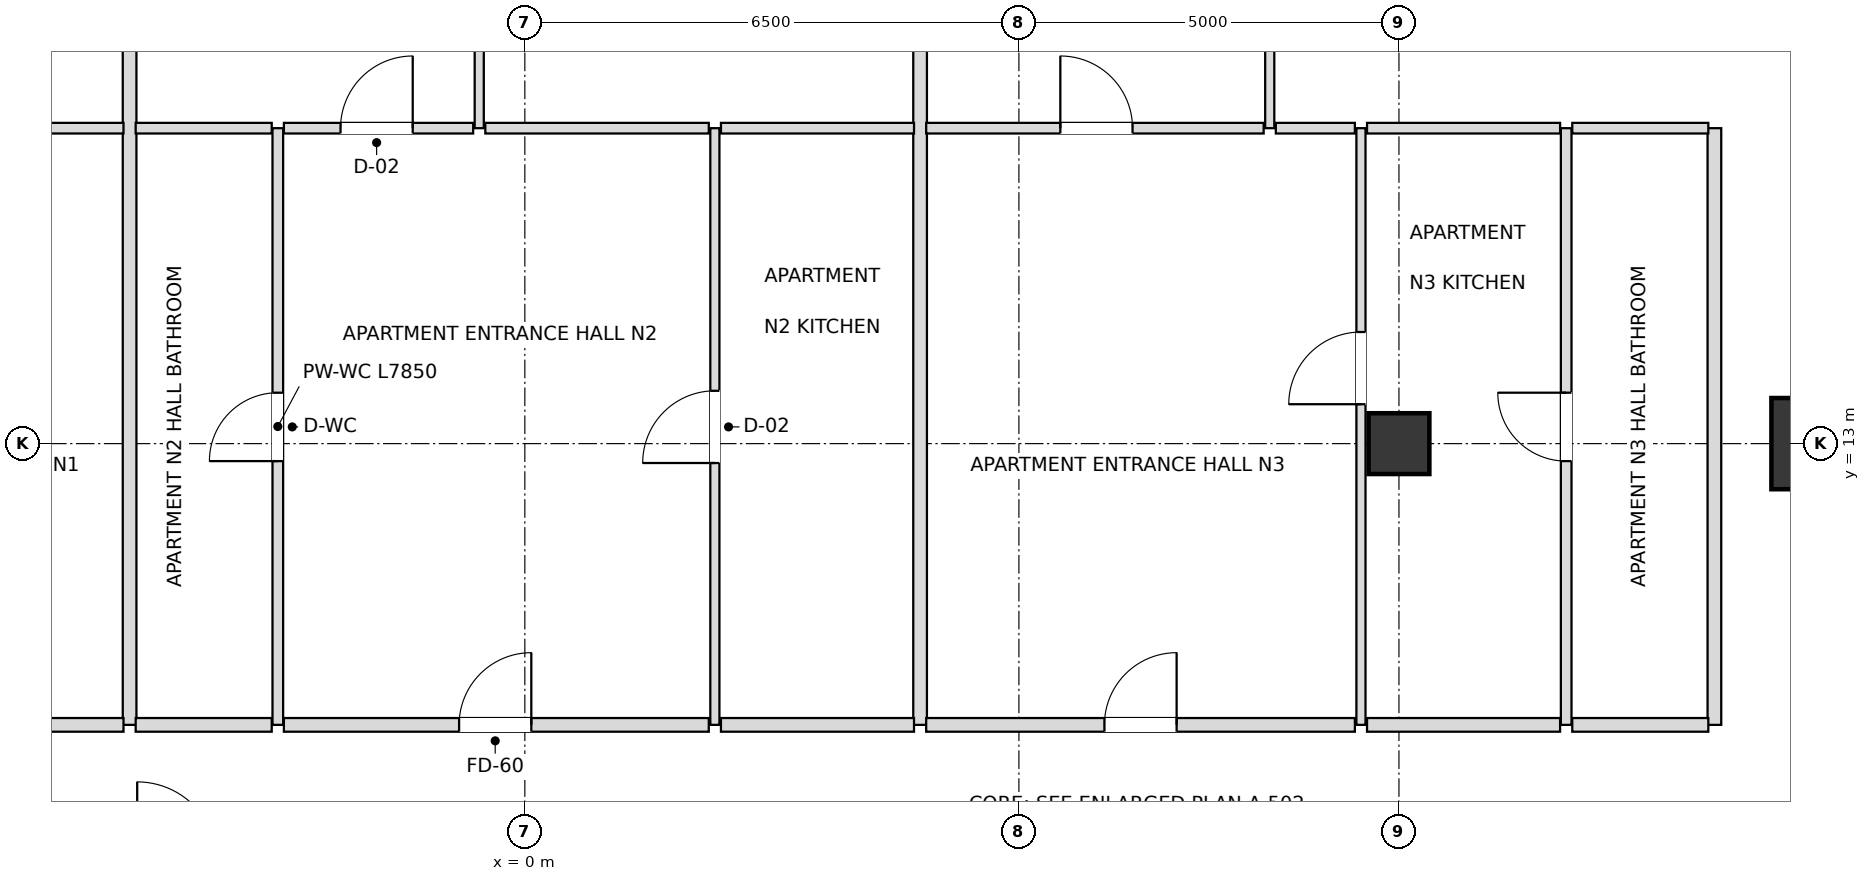
"""IFC4 building model, lengths in metres.
Left out: names, types, materials, properties, quantities, classifications, styles, units other than length and angle.
Written with IfcOpenShell. Run it as: python <this file> out.ifc"""

import sys

from ifc_helpers import new_model, si_unit, direction, frame, frame_2d, origin, origin_2d, place, context, subcontext, project, spatial, rectangle, extrude, element, fill, save


model = new_model("IFC4")
c1 = context("Model", 3, precision=1e-05, world=origin(), true_north=direction((0.0, 1.0)))
c2 = subcontext(c1, "Body", "Model", "MODEL_VIEW")
j1 = project(units=[si_unit("LENGTHUNIT", "METRE"), si_unit("PLANEANGLEUNIT", "RADIAN")], contexts=[c1])
p1 = place(None, origin())
s1 = spatial("IfcSite", under=j1, at=p1, CompositionType="ELEMENT")
p2 = place(p1, origin())
s2 = spatial("IfcBuilding", under=s1, at=p2, CompositionType="ELEMENT")
p3 = place(p2, frame((0.0, 0.0, 106.2)))
s3 = spatial("IfcBuildingStorey", under=s2, at=p3, CompositionType="ELEMENT", Elevation=106.2)
p4 = place(p3, frame((17.0, 13.0, 0.0), z_axis=(0.0, 0.0, 1.0), x_axis=(1.0, 0.0, 0.0)))
e1 = element("IfcColumn", 1, at=p4, inside=s3, PredefinedType="USERDEFINED", context=c2, shape_type="SweptSolid", body=[
    extrude(rectangle(XDim=1.2, YDim=1.2, at=origin_2d()), origin(), (0.0, 0.0, 1.0), 3.6),
])
p5 = place(p3, frame((11.5, 13.0, 0.0), z_axis=(0.0, 0.0, 1.0), x_axis=(1.0, 0.0, 0.0)))
e2 = element("IfcColumn", 2, at=p5, inside=s3, PredefinedType="COLUMN", context=c2, shape_type="SweptSolid", body=[
    extrude(rectangle(XDim=0.8, YDim=0.8, at=origin_2d()), origin(), (0.0, 0.0, 1.0), 3.6),
])
p6 = place(p3, frame((-5.2, 9.3, 0.0), z_axis=(0.0, 0.0, 1.0), x_axis=(0.0, 1.0, 0.0)))
e3 = element("IfcWall", 3, at=p6, inside=s3, PredefinedType="PARTITIONING", context=c2, shape_type="SweptSolid", body=[
    extrude(rectangle(XDim=13.85, YDim=0.18, at=frame_2d((6.925, 0.0))), origin(), (0.0, 0.0, 1.0), 2.816),
])
p7 = place(p3, frame((-3.25, 9.3, 0.0), z_axis=(0.0, 0.0, 1.0), x_axis=(0.0, 1.0, 0.0)))
e4 = element("IfcWall", 4, at=p7, inside=s3, PredefinedType="PARTITIONING", context=c2, shape_type="SweptSolid", body=[
    extrude(rectangle(XDim=7.85, YDim=0.14, at=frame_2d((3.925, 0.0))), origin(), (0.0, 0.0, 1.0), 3.38),
])
p8 = place(p7, frame((3.47, 0.0, 0.0)))
e5 = element("IfcOpeningElement", 5, at=p8, cuts=e4, PredefinedType="OPENING", context=c2, shape_type="SweptSolid", body=[
    extrude(rectangle(XDim=0.9, YDim=2.1, at=frame_2d((0.45, 1.05))), frame((0.0, 0.08, 0.0), z_axis=(0.0, -1.0, 0.0), x_axis=(1.0, 0.0, 0.0)), (0.0, 0.0, 1.0), 0.16),
])
p9 = place(p3, frame((-0.6, 17.15, 0.0), z_axis=(0.0, 0.0, 1.0), x_axis=(0.0, 1.0, 0.0)))
e6 = element("IfcWall", 6, at=p9, inside=s3, PredefinedType="PARTITIONING", context=c2, shape_type="SweptSolid", body=[
    extrude(rectangle(XDim=6.0, YDim=0.12, at=frame_2d((3.0, 0.0))), origin(), (0.0, 0.0, 1.0), 2.816),
])
p10 = place(p9, frame((2.55, 0.0, 0.0)))
e7 = element("IfcOpeningElement", 7, at=p10, cuts=e6, PredefinedType="OPENING", context=c2, shape_type="SweptSolid", body=[
    extrude(rectangle(XDim=0.9, YDim=2.1, at=frame_2d((0.45, 1.05))), frame((0.0, 0.07, 0.0), z_axis=(0.0, -1.0, 0.0), x_axis=(1.0, 0.0, 0.0)), (0.0, 0.0, 1.0), 0.14),
])
p11 = place(p3, frame((2.5, 9.3, 0.0), z_axis=(0.0, 0.0, 1.0), x_axis=(0.0, 1.0, 0.0)))
e8 = element("IfcWall", 8, at=p11, inside=s3, PredefinedType="PARTITIONING", context=c2, shape_type="SweptSolid", body=[
    extrude(rectangle(XDim=7.85, YDim=0.12, at=frame_2d((3.925, 0.0))), origin(), (0.0, 0.0, 1.0), 3.38),
])
p12 = place(p11, frame((3.445, 0.0, 0.0)))
e9 = element("IfcOpeningElement", 9, at=p12, cuts=e8, PredefinedType="OPENING", context=c2, shape_type="SweptSolid", body=[
    extrude(rectangle(XDim=0.95, YDim=2.1, at=frame_2d((0.475, 1.05))), frame((0.0, 0.07, 0.0), z_axis=(0.0, -1.0, 0.0), x_axis=(1.0, 0.0, 0.0)), (0.0, 0.0, 1.0), 0.14),
])
p13 = place(p3, frame((5.2, 9.3, 0.0), z_axis=(0.0, 0.0, 1.0), x_axis=(0.0, 1.0, 0.0)))
e10 = element("IfcWall", 10, at=p13, inside=s3, PredefinedType="PARTITIONING", context=c2, shape_type="SweptSolid", body=[
    extrude(rectangle(XDim=13.85, YDim=0.18, at=frame_2d((6.925, 0.0))), origin(), (0.0, 0.0, 1.0), 2.816),
])
p14 = place(p3, frame((9.8, 17.15, 0.0), z_axis=(0.0, 0.0, 1.0), x_axis=(0.0, 1.0, 0.0)))
e11 = element("IfcWall", 11, at=p14, inside=s3, PredefinedType="PARTITIONING", context=c2, shape_type="SweptSolid", body=[
    extrude(rectangle(XDim=6.0, YDim=0.12, at=frame_2d((3.0, 0.0))), origin(), (0.0, 0.0, 1.0), 2.816),
])
p15 = place(p14, frame((3.701, 0.0, 0.0)))
e12 = element("IfcOpeningElement", 12, at=p15, cuts=e11, PredefinedType="OPENING", context=c2, shape_type="SweptSolid", body=[
    extrude(rectangle(XDim=0.9, YDim=2.1, at=frame_2d((0.45, 1.05))), frame((0.0, 0.07, 0.0), z_axis=(0.0, -1.0, 0.0), x_axis=(1.0, 0.0, 0.0)), (0.0, 0.0, 1.0), 0.14),
])
p16 = place(p3, frame((11.0, 9.3, 0.0), z_axis=(0.0, 0.0, 1.0), x_axis=(0.0, 1.0, 0.0)))
e13 = element("IfcWall", 13, at=p16, inside=s3, PredefinedType="PARTITIONING", context=c2, shape_type="SweptSolid", body=[
    extrude(rectangle(XDim=7.85, YDim=0.12, at=frame_2d((3.925, 0.0))), origin(), (0.0, 0.0, 1.0), 2.816),
])
p17 = place(p16, frame((4.219, 0.0, 0.0)))
e14 = element("IfcOpeningElement", 14, at=p17, cuts=e13, PredefinedType="OPENING", context=c2, shape_type="SweptSolid", body=[
    extrude(rectangle(XDim=0.95, YDim=2.1, at=frame_2d((0.475, 1.05))), frame((0.0, 0.07, 0.0), z_axis=(0.0, -1.0, 0.0), x_axis=(1.0, 0.0, 0.0)), (0.0, 0.0, 1.0), 0.14),
])
p18 = place(p3, frame((13.7, 9.3, 0.0), z_axis=(0.0, 0.0, 1.0), x_axis=(0.0, 1.0, 0.0)))
e15 = element("IfcWall", 15, at=p18, inside=s3, PredefinedType="PARTITIONING", context=c2, shape_type="SweptSolid", body=[
    extrude(rectangle(XDim=7.85, YDim=0.14, at=frame_2d((3.925, 0.0))), origin(), (0.0, 0.0, 1.0), 2.736),
])
p19 = place(p18, frame((3.47, 0.0, 0.0)))
e16 = element("IfcOpeningElement", 16, at=p19, cuts=e15, PredefinedType="OPENING", context=c2, shape_type="SweptSolid", body=[
    extrude(rectangle(XDim=0.9, YDim=2.1, at=frame_2d((0.45, 1.05))), frame((0.0, 0.08, 0.0), z_axis=(0.0, -1.0, 0.0), x_axis=(1.0, 0.0, 0.0)), (0.0, 0.0, 1.0), 0.16),
])
p20 = place(p3, frame((15.65, 9.3, 0.0), z_axis=(0.0, 0.0, 1.0), x_axis=(0.0, 1.0, 0.0)))
e17 = element("IfcWall", 17, at=p20, inside=s3, PredefinedType="PARTITIONING", context=c2, shape_type="SweptSolid", body=[
    extrude(rectangle(XDim=7.85, YDim=0.18, at=frame_2d((3.925, 0.0))), origin(), (0.0, 0.0, 1.0), 2.736),
])
p21 = place(p3, frame((-10.92, 9.3, 0.0), z_axis=(0.0, 0.0, 1.0), x_axis=(1.0, 0.0, 0.0)))
e18 = element("IfcWall", 18, at=p21, inside=s3, PredefinedType="PARTITIONING", context=c2, shape_type="SweptSolid", body=[
    extrude(rectangle(XDim=5.64, YDim=0.18, at=frame_2d((2.82, 0.0))), origin(), (0.0, 0.0, 1.0), 2.816),
])
p22 = place(p21, frame((2.335, 0.0, 0.0)))
e19 = element("IfcOpeningElement", 19, at=p22, cuts=e18, PredefinedType="OPENING", context=c2, shape_type="SweptSolid", body=[
    extrude(rectangle(XDim=0.95, YDim=2.15, at=frame_2d((0.475, 1.075))), frame((0.0, 0.1, 0.0), z_axis=(0.0, -1.0, 0.0), x_axis=(1.0, 0.0, 0.0)), (0.0, 0.0, 1.0), 0.2),
])
p23 = place(p3, frame((-5.12, 9.3, 0.0), z_axis=(0.0, 0.0, 1.0), x_axis=(1.0, 0.0, 0.0)))
e20 = element("IfcWall", 20, at=p23, inside=s3, PredefinedType="PARTITIONING", context=c2, shape_type="SweptSolid", body=[
    extrude(rectangle(XDim=1.79, YDim=0.18, at=frame_2d((0.895, 0.0))), origin(), (0.0, 0.0, 1.0), 3.38),
])
p24 = place(p3, frame((-3.17, 9.3, 0.0), z_axis=(0.0, 0.0, 1.0), x_axis=(1.0, 0.0, 0.0)))
e21 = element("IfcWall", 21, at=p24, inside=s3, PredefinedType="PARTITIONING", context=c2, shape_type="SweptSolid", body=[
    extrude(rectangle(XDim=5.59, YDim=0.18, at=frame_2d((2.795, 0.0))), origin(), (0.0, 0.0, 1.0), 3.38),
])
p25 = place(p24, frame((2.305, 0.0, 0.0)))
e22 = element("IfcOpeningElement", 22, at=p25, cuts=e21, PredefinedType="OPENING", context=c2, shape_type="SweptSolid", body=[
    extrude(rectangle(XDim=0.95, YDim=2.15, at=frame_2d((0.475, 1.075))), frame((0.0, 0.1, 0.0), z_axis=(0.0, -1.0, 0.0), x_axis=(1.0, 0.0, 0.0)), (0.0, 0.0, 1.0), 0.2),
])
p26 = place(p3, frame((2.58, 9.3, 0.0), z_axis=(0.0, 0.0, 1.0), x_axis=(1.0, 0.0, 0.0)))
e23 = element("IfcWall", 23, at=p26, inside=s3, PredefinedType="PARTITIONING", context=c2, shape_type="SweptSolid", body=[
    extrude(rectangle(XDim=2.54, YDim=0.18, at=frame_2d((1.27, 0.0))), origin(), (0.0, 0.0, 1.0), 3.38),
])
p27 = place(p3, frame((5.28, 9.3, 0.0), z_axis=(0.0, 0.0, 1.0), x_axis=(1.0, 0.0, 0.0)))
e24 = element("IfcWall", 24, at=p27, inside=s3, PredefinedType="PARTITIONING", context=c2, shape_type="SweptSolid", body=[
    extrude(rectangle(XDim=5.64, YDim=0.18, at=frame_2d((2.82, 0.0))), origin(), (0.0, 0.0, 1.0), 2.816),
])
p28 = place(p27, frame((2.345, 0.0, 0.0)))
e25 = element("IfcOpeningElement", 25, at=p28, cuts=e24, PredefinedType="OPENING", context=c2, shape_type="SweptSolid", body=[
    extrude(rectangle(XDim=0.95, YDim=2.15, at=frame_2d((0.475, 1.075))), frame((0.0, 0.1, 0.0), z_axis=(0.0, -1.0, 0.0), x_axis=(1.0, 0.0, 0.0)), (0.0, 0.0, 1.0), 0.2),
])
p29 = place(p3, frame((11.08, 9.3, 0.0), z_axis=(0.0, 0.0, 1.0), x_axis=(1.0, 0.0, 0.0)))
e26 = element("IfcWall", 26, at=p29, inside=s3, PredefinedType="PARTITIONING", context=c2, shape_type="SweptSolid", body=[
    extrude(rectangle(XDim=2.54, YDim=0.18, at=frame_2d((1.27, 0.0))), origin(), (0.0, 0.0, 1.0), 3.38),
])
p30 = place(p3, frame((13.78, 9.3, 0.0), z_axis=(0.0, 0.0, 1.0), x_axis=(1.0, 0.0, 0.0)))
e27 = element("IfcWall", 27, at=p30, inside=s3, PredefinedType="PARTITIONING", context=c2, shape_type="SweptSolid", body=[
    extrude(rectangle(XDim=1.79, YDim=0.18, at=frame_2d((0.895, 0.0))), origin(), (0.0, 0.0, 1.0), 3.38),
])
p31 = place(p3, frame((-9.72, 17.15, 0.0), z_axis=(0.0, 0.0, 1.0), x_axis=(1.0, 0.0, 0.0)))
e28 = element("IfcWall", 28, at=p31, inside=s3, PredefinedType="PARTITIONING", context=c2, shape_type="SweptSolid", body=[
    extrude(rectangle(XDim=4.44, YDim=0.14, at=frame_2d((2.22, 0.0))), origin(), (0.0, 0.0, 1.0), 2.816),
])
p32 = place(p31, frame((1.725, 0.0, 0.0)))
e29 = element("IfcOpeningElement", 29, at=p32, cuts=e28, PredefinedType="OPENING", context=c2, shape_type="SweptSolid", body=[
    extrude(rectangle(XDim=0.95, YDim=2.1, at=frame_2d((0.475, 1.05))), frame((0.0, 0.08, 0.0), z_axis=(0.0, -1.0, 0.0), x_axis=(1.0, 0.0, 0.0)), (0.0, 0.0, 1.0), 0.16),
])
p33 = place(p3, frame((-5.12, 17.15, 0.0), z_axis=(0.0, 0.0, 1.0), x_axis=(1.0, 0.0, 0.0)))
e30 = element("IfcWall", 30, at=p33, inside=s3, PredefinedType="PARTITIONING", context=c2, shape_type="SweptSolid", body=[
    extrude(rectangle(XDim=1.79, YDim=0.14, at=frame_2d((0.895, 0.0))), origin(), (0.0, 0.0, 1.0), 3.38),
])
p34 = place(p3, frame((-3.17, 17.15, 0.0), z_axis=(0.0, 0.0, 1.0), x_axis=(1.0, 0.0, 0.0)))
e31 = element("IfcWall", 31, at=p34, inside=s3, PredefinedType="PARTITIONING", context=c2, shape_type="SweptSolid", body=[
    extrude(rectangle(XDim=2.49, YDim=0.14, at=frame_2d((1.245, 0.0))), origin(), (0.0, 0.0, 1.0), 3.38),
])
p35 = place(p34, frame((0.745, 0.0, 0.0)))
e32 = element("IfcOpeningElement", 32, at=p35, cuts=e31, PredefinedType="OPENING", context=c2, shape_type="SweptSolid", body=[
    extrude(rectangle(XDim=0.95, YDim=2.1, at=frame_2d((0.475, 1.05))), frame((0.0, 0.08, 0.0), z_axis=(0.0, -1.0, 0.0), x_axis=(1.0, 0.0, 0.0)), (0.0, 0.0, 1.0), 0.16),
])
p36 = place(p3, frame((-0.52, 17.15, 0.0), z_axis=(0.0, 0.0, 1.0), x_axis=(1.0, 0.0, 0.0)))
e33 = element("IfcWall", 33, at=p36, inside=s3, PredefinedType="PARTITIONING", context=c2, shape_type="SweptSolid", body=[
    extrude(rectangle(XDim=2.94, YDim=0.14, at=frame_2d((1.47, 0.0))), origin(), (0.0, 0.0, 1.0), 3.38),
])
p37 = place(p3, frame((2.58, 17.15, 0.0), z_axis=(0.0, 0.0, 1.0), x_axis=(1.0, 0.0, 0.0)))
e34 = element("IfcWall", 34, at=p37, inside=s3, PredefinedType="PARTITIONING", context=c2, shape_type="SweptSolid", body=[
    extrude(rectangle(XDim=2.54, YDim=0.14, at=frame_2d((1.27, 0.0))), origin(), (0.0, 0.0, 1.0), 3.38),
])
p38 = place(p3, frame((5.28, 17.15, 0.0), z_axis=(0.0, 0.0, 1.0), x_axis=(1.0, 0.0, 0.0)))
e35 = element("IfcWall", 35, at=p38, inside=s3, PredefinedType="PARTITIONING", context=c2, shape_type="SweptSolid", body=[
    extrude(rectangle(XDim=4.44, YDim=0.14, at=frame_2d((2.22, 0.0))), origin(), (0.0, 0.0, 1.0), 2.816),
])
p39 = place(p38, frame((1.765, 0.0, 0.0)))
e36 = element("IfcOpeningElement", 36, at=p39, cuts=e35, PredefinedType="OPENING", context=c2, shape_type="SweptSolid", body=[
    extrude(rectangle(XDim=0.95, YDim=2.1, at=frame_2d((0.475, 1.05))), frame((0.0, 0.08, 0.0), z_axis=(0.0, -1.0, 0.0), x_axis=(1.0, 0.0, 0.0)), (0.0, 0.0, 1.0), 0.16),
])
p40 = place(p3, frame((9.88, 17.15, 0.0), z_axis=(0.0, 0.0, 1.0), x_axis=(1.0, 0.0, 0.0)))
e37 = element("IfcWall", 37, at=p40, inside=s3, PredefinedType="PARTITIONING", context=c2, shape_type="SweptSolid", body=[
    extrude(rectangle(XDim=1.04, YDim=0.14, at=frame_2d((0.52, 0.0))), origin(), (0.0, 0.0, 1.0), 3.38),
])
p41 = place(p3, frame((11.08, 17.15, 0.0), z_axis=(0.0, 0.0, 1.0), x_axis=(1.0, 0.0, 0.0)))
e38 = element("IfcWall", 38, at=p41, inside=s3, PredefinedType="PARTITIONING", context=c2, shape_type="SweptSolid", body=[
    extrude(rectangle(XDim=2.54, YDim=0.14, at=frame_2d((1.27, 0.0))), origin(), (0.0, 0.0, 1.0), 2.736),
])
p42 = place(p3, frame((13.78, 17.15, 0.0), z_axis=(0.0, 0.0, 1.0), x_axis=(1.0, 0.0, 0.0)))
e39 = element("IfcWall", 39, at=p42, inside=s3, PredefinedType="PARTITIONING", context=c2, shape_type="SweptSolid", body=[
    extrude(rectangle(XDim=1.79, YDim=0.14, at=frame_2d((0.895, 0.0))), origin(), (0.0, 0.0, 1.0), 2.736),
])
p43 = place(p8, origin())
e40 = element("IfcDoor", 40, at=p43, inside=s3, OperationType="SINGLE_SWING_LEFT", PredefinedType="DOOR", context=c2, shape_type="SweptSolid", body=[
    extrude(rectangle(XDim=0.9, YDim=2.1, at=frame_2d((0.45, 1.05))), frame((0.0, 0.025, 0.0), z_axis=(0.0, -1.0, 0.0), x_axis=(1.0, 0.0, 0.0)), (0.0, 0.0, 1.0), 0.05),
])
fill(e5, e40)
p44 = place(p25, origin())
e41 = element("IfcDoor", 41, at=p44, inside=s3, OperationType="SINGLE_SWING_RIGHT", PredefinedType="DOOR", context=c2, shape_type="SweptSolid", body=[
    extrude(rectangle(XDim=0.95, YDim=2.15, at=frame_2d((0.475, 1.075))), frame((0.0, 0.025, 0.0), z_axis=(0.0, -1.0, 0.0), x_axis=(1.0, 0.0, 0.0)), (0.0, 0.0, 1.0), 0.05),
])
fill(e22, e41)
p45 = place(p12, origin())
e42 = element("IfcDoor", 42, at=p45, inside=s3, OperationType="SINGLE_SWING_LEFT", PredefinedType="DOOR", context=c2, shape_type="SweptSolid", body=[
    extrude(rectangle(XDim=0.95, YDim=2.1, at=frame_2d((0.475, 1.05))), frame((0.0, 0.025, 0.0), z_axis=(0.0, -1.0, 0.0), x_axis=(1.0, 0.0, 0.0)), (0.0, 0.0, 1.0), 0.05),
])
fill(e9, e42)
p46 = place(p35, origin())
e43 = element("IfcDoor", 43, at=p46, inside=s3, OperationType="SINGLE_SWING_RIGHT", PredefinedType="DOOR", context=c2, shape_type="SweptSolid", body=[
    extrude(rectangle(XDim=0.95, YDim=2.1, at=frame_2d((0.475, 1.05))), frame((0.0, 0.025, 0.0), z_axis=(0.0, -1.0, 0.0), x_axis=(1.0, 0.0, 0.0)), (0.0, 0.0, 1.0), 0.05),
])
fill(e32, e43)
p47 = place(p28, origin())
e44 = element("IfcDoor", 44, at=p47, inside=s3, OperationType="SINGLE_SWING_RIGHT", PredefinedType="DOOR", context=c2, shape_type="SweptSolid", body=[
    extrude(rectangle(XDim=0.95, YDim=2.15, at=frame_2d((0.475, 1.075))), frame((0.0, 0.025, 0.0), z_axis=(0.0, -1.0, 0.0), x_axis=(1.0, 0.0, 0.0)), (0.0, 0.0, 1.0), 0.05),
])
fill(e25, e44)
p48 = place(p17, origin())
e45 = element("IfcDoor", 45, at=p48, inside=s3, OperationType="SINGLE_SWING_LEFT", PredefinedType="DOOR", context=c2, shape_type="SweptSolid", body=[
    extrude(rectangle(XDim=0.95, YDim=2.1, at=frame_2d((0.475, 1.05))), frame((0.0, 0.025, 0.0), z_axis=(0.0, -1.0, 0.0), x_axis=(1.0, 0.0, 0.0)), (0.0, 0.0, 1.0), 0.05),
])
fill(e14, e45)
p49 = place(p19, origin())
e46 = element("IfcDoor", 46, at=p49, inside=s3, OperationType="SINGLE_SWING_RIGHT", PredefinedType="DOOR", context=c2, shape_type="SweptSolid", body=[
    extrude(rectangle(XDim=0.9, YDim=2.1, at=frame_2d((0.45, 1.05))), frame((0.0, 0.025, 0.0), z_axis=(0.0, -1.0, 0.0), x_axis=(1.0, 0.0, 0.0)), (0.0, 0.0, 1.0), 0.05),
])
fill(e16, e46)
p50 = place(p39, origin())
e47 = element("IfcDoor", 47, at=p50, inside=s3, OperationType="SINGLE_SWING_LEFT", PredefinedType="DOOR", context=c2, shape_type="SweptSolid", body=[
    extrude(rectangle(XDim=0.95, YDim=2.1, at=frame_2d((0.475, 1.05))), frame((0.0, 0.025, 0.0), z_axis=(0.0, -1.0, 0.0), x_axis=(1.0, 0.0, 0.0)), (0.0, 0.0, 1.0), 0.05),
])
fill(e36, e47)
save(model, sys.argv[1])
